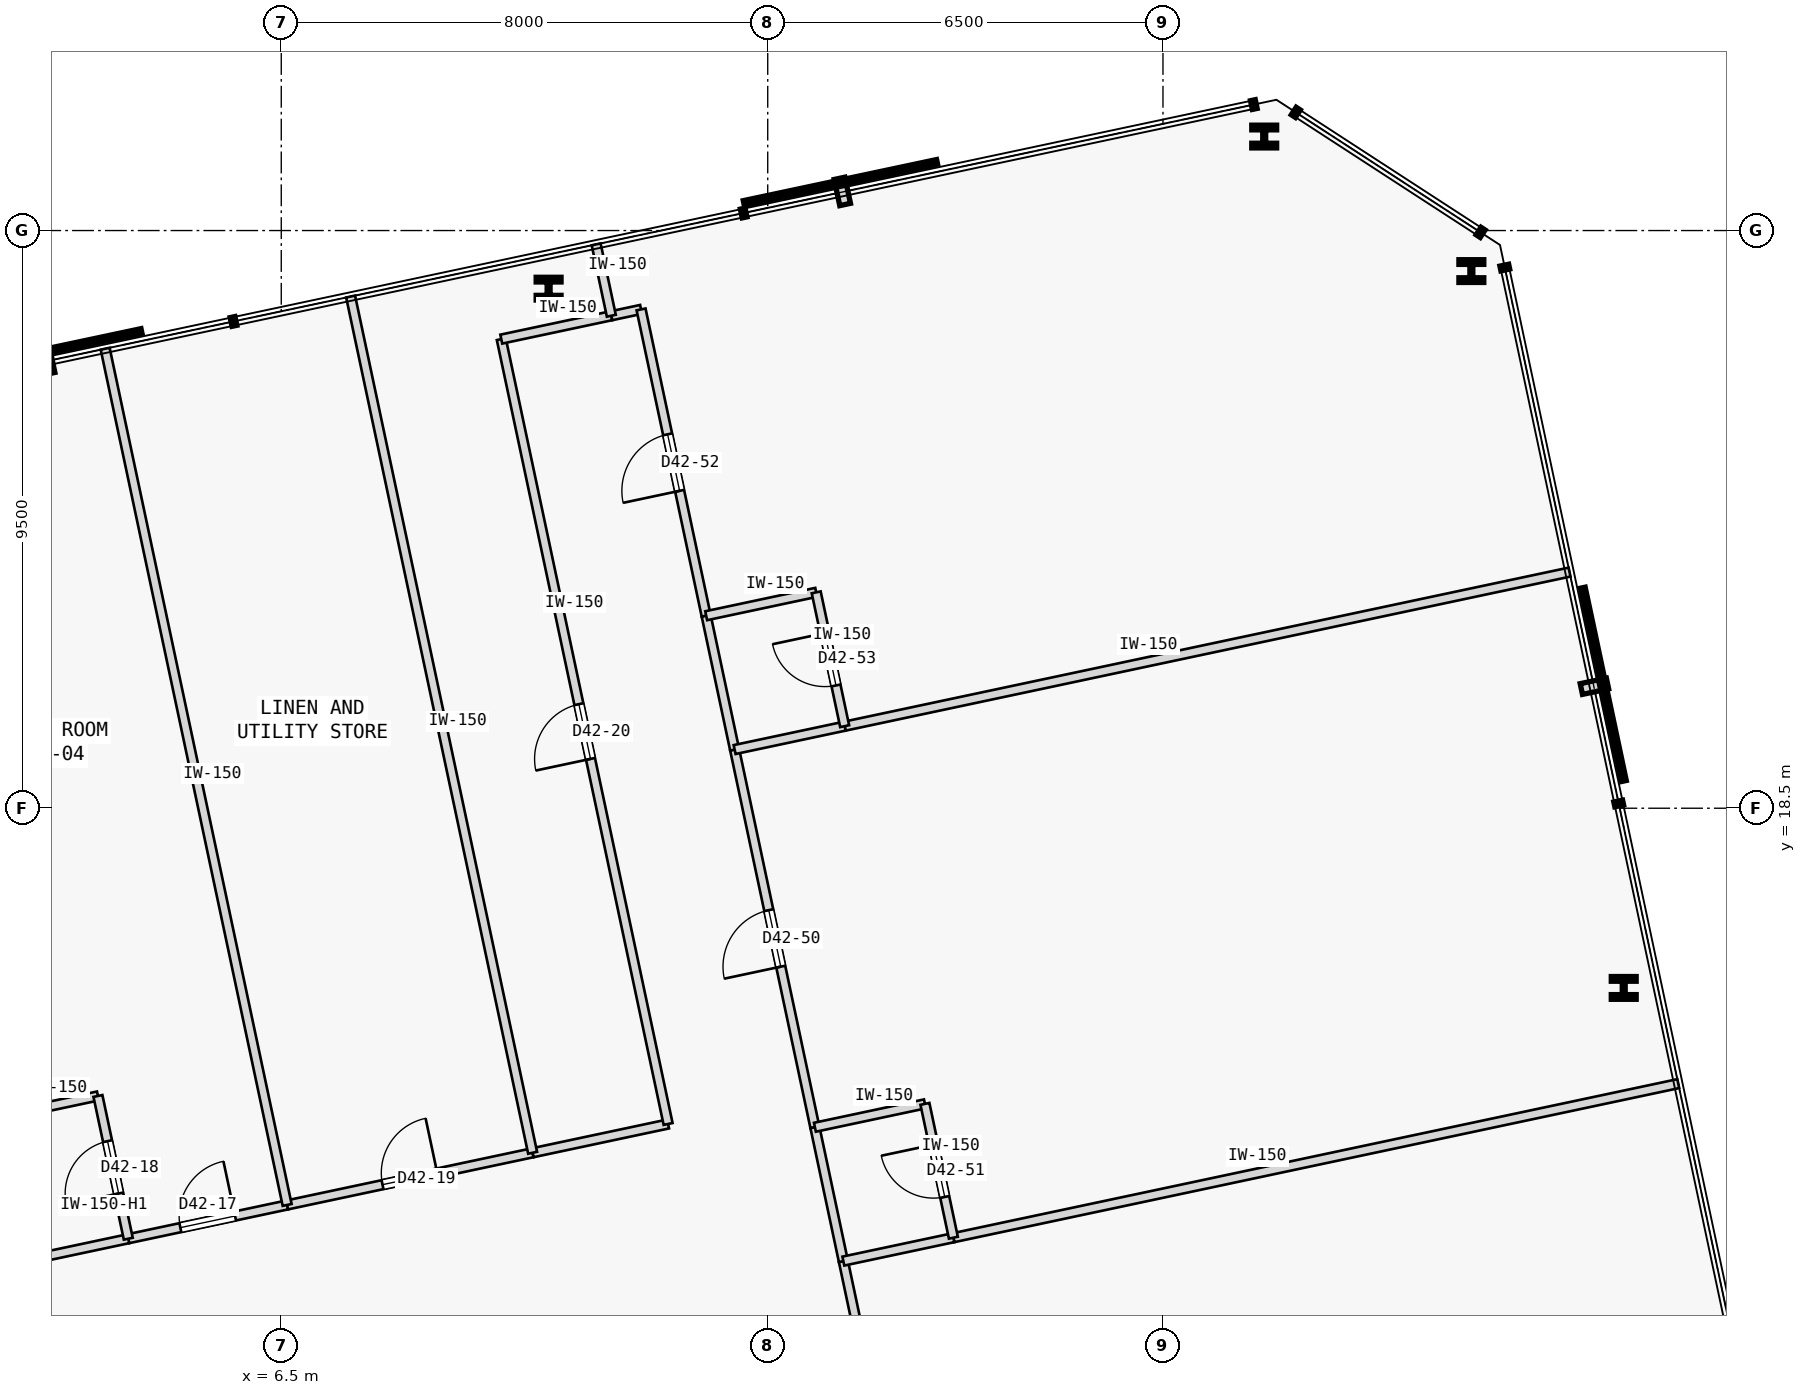
"""IFC4 building model, lengths in metres.
Left out: names, types, materials, properties, quantities, classifications, styles, units other than length and angle.
Written with IfcOpenShell. Run it as: python <this file> out.ifc"""

import sys

from ifc_helpers import new_model, si_unit, direction, frame, frame_2d, origin, origin_2d, place, context, subcontext, project, spatial, rectangle, i_section, extrude, element, fill, save


model = new_model("IFC4")
c1 = context("Model", 3, precision=1e-05, world=origin(), true_north=direction((0.0, 1.0)))
c2 = subcontext(c1, "Body", "Model", "MODEL_VIEW")
j1 = project(units=[si_unit("LENGTHUNIT", "METRE"), si_unit("PLANEANGLEUNIT", "RADIAN")], contexts=[c1])
p1 = place(None, origin())
s1 = spatial("IfcSite", under=j1, at=p1, CompositionType="ELEMENT")
p2 = place(p1, origin())
s2 = spatial("IfcBuilding", under=s1, at=p2, CompositionType="ELEMENT")
p3 = place(p2, frame((0.0, 0.0, 165.0)))
s3 = spatial("IfcBuildingStorey", under=s2, at=p3, CompositionType="ELEMENT", Elevation=165.0)
for number, where, z_axis, x_axis in (
    (1, (28.577, 15.545, 0.0), (0.0, 0.0, 1.0), (1.0, 0.0, 0.0)),
    (2, (26.071, 27.333, 0.0), (0.0, 0.0, 1.0), (1.0, 0.0, 0.0)),
    (3, (22.665, 29.546, 0.0), (0.0, 0.0, 1.0), (1.0, 0.0, 0.0)),
    (4, (10.896, 27.044, 0.0), (0.0, 0.0, 1.0), (1.0, 0.0, 0.0)),
):
    element("IfcColumn", number, at=place(p3, frame(where, z_axis=z_axis, x_axis=x_axis)), inside=s3, PredefinedType="COLUMN", context=c2, shape_type="SweptSolid", body=[
        extrude(i_section(OverallWidth=0.409, OverallDepth=0.374, WebThickness=0.048, FlangeThickness=0.077, FilletRadius=0.015, at=origin_2d()), origin(), (0.0, 0.0, 1.0), 3.4),
    ])
p4 = place(p3, frame((3.984, 11.421, 0.0), z_axis=(0.0, 0.0, 1.0), x_axis=(0.978139565144, 0.207949491702, 0.0)))
e5 = element("IfcWall", 5, at=p4, inside=s3, PredefinedType="PARTITIONING", context=c2, shape_type="SweptSolid", body=[
    extrude(rectangle(XDim=2.671, YDim=0.15, at=frame_2d((1.335, 0.0))), origin(), (0.0, 0.0, 1.0), 3.175),
])
p5 = place(p4, frame((0.875, 0.0, 0.0)))
e6 = element("IfcOpeningElement", 6, at=p5, cuts=e5, PredefinedType="OPENING", context=c2, shape_type="SweptSolid", body=[
    extrude(rectangle(XDim=0.92, YDim=2.15, at=frame_2d((0.46, 1.075))), frame((0.0, 0.085, 0.0), z_axis=(0.0, -1.0, 0.0), x_axis=(1.0, 0.0, 0.0)), (0.0, 0.0, 1.0), 0.17),
])
p6 = place(p3, frame((2.223, 11.046, 0.0), z_axis=(0.0, 0.0, 1.0), x_axis=(0.978146440129, 0.207917150959, 0.0)))
e7 = element("IfcWall", 7, at=p6, inside=s3, PredefinedType="PARTITIONING", context=c2, shape_type="SweptSolid", body=[
    extrude(rectangle(XDim=1.8, YDim=0.15, at=frame_2d((0.9, 0.0))), origin(), (0.0, 0.0, 1.0), 3.175),
])
p7 = place(p3, frame((6.597, 11.976, 0.0), z_axis=(0.0, 0.0, 1.0), x_axis=(0.978155092113, 0.207876443525, 0.0)))
e8 = element("IfcWall", 8, at=p7, inside=s3, PredefinedType="PARTITIONING", context=c2, shape_type="SweptSolid", body=[
    extrude(rectangle(XDim=4.127, YDim=0.15, at=frame_2d((2.063, 0.0))), origin(), (0.0, 0.0, 1.0), 3.175),
])
p8 = place(p7, frame((1.604, 0.0, 0.0)))
e9 = element("IfcOpeningElement", 9, at=p8, cuts=e8, PredefinedType="OPENING", context=c2, shape_type="SweptSolid", body=[
    extrude(rectangle(XDim=0.92, YDim=2.15, at=frame_2d((0.46, 1.075))), frame((0.0, 0.085, 0.0), z_axis=(0.0, -1.0, 0.0), x_axis=(1.0, 0.0, 0.0)), (0.0, 0.0, 1.0), 0.17),
])
p9 = place(p3, frame((10.634, 12.834, 0.0), z_axis=(0.0, 0.0, 1.0), x_axis=(0.978147682212, 0.207911307493, 0.0)))
e10 = element("IfcWall", 10, at=p9, inside=s3, PredefinedType="PARTITIONING", context=c2, shape_type="SweptSolid", body=[
    extrude(rectangle(XDim=2.278, YDim=0.15, at=frame_2d((1.139, 0.0))), origin(), (0.0, 0.0, 1.0), 3.175),
])
p10 = place(p3, frame((12.862, 13.308, 0.0), z_axis=(0.0, 0.0, 1.0), x_axis=(-0.207911421929, 0.978147657888, 0.0)))
e11 = element("IfcWall", 11, at=p10, inside=s3, PredefinedType="PARTITIONING", context=c2, shape_type="SweptSolid", body=[
    extrude(rectangle(XDim=13.195, YDim=0.15, at=frame_2d((6.598, 0.0))), origin(), (0.0, 0.0, 1.0), 3.175),
])
p11 = place(p10, frame((6.137, 0.0, 0.0)))
e12 = element("IfcOpeningElement", 12, at=p11, cuts=e11, PredefinedType="OPENING", context=c2, shape_type="SweptSolid", body=[
    extrude(rectangle(XDim=0.92, YDim=2.15, at=frame_2d((0.46, 1.075))), frame((0.0, 0.085, 0.0), z_axis=(0.0, -1.0, 0.0), x_axis=(1.0, 0.0, 0.0)), (0.0, 0.0, 1.0), 0.17),
])
p12 = place(p3, frame((10.118, 26.214, 0.0), z_axis=(0.0, 0.0, 1.0), x_axis=(0.978133353907, 0.20797870558, 0.0)))
e13 = element("IfcWall", 13, at=p12, inside=s3, PredefinedType="PARTITIONING", context=c2, shape_type="SweptSolid", body=[
    extrude(rectangle(XDim=1.85, YDim=0.15, at=frame_2d((0.925, 0.0))), origin(), (0.0, 0.0, 1.0), 3.175),
])
p13 = place(p3, frame((17.064, 4.841, 0.0), z_axis=(0.0, 0.0, 1.0), x_axis=(-0.207924511115, 0.978144875608, 0.0)))
e14 = element("IfcWall", 14, at=p13, inside=s3, PredefinedType="PARTITIONING", context=c2, shape_type="SweptSolid", body=[
    extrude(rectangle(XDim=6.35, YDim=0.15, at=frame_2d((3.175, 0.0))), origin(), (0.0, 0.0, 1.0), 3.175),
])
p14 = place(p13, frame((2.7, 0.0, 0.0)))
e15 = element("IfcOpeningElement", 15, at=p14, cuts=e14, PredefinedType="OPENING", context=c2, shape_type="SweptSolid", body=[
    extrude(rectangle(XDim=0.95, YDim=2.15, at=frame_2d((0.475, 1.075))), frame((0.0, 0.085, 0.0), z_axis=(0.0, -1.0, 0.0), x_axis=(1.0, 0.0, 0.0)), (0.0, 0.0, 1.0), 0.17),
])
p15 = place(p3, frame((15.276, 13.253, 0.0), z_axis=(0.0, 0.0, 1.0), x_axis=(-0.207924511115, 0.978144875608, 0.0)))
e16 = element("IfcWall", 16, at=p15, inside=s3, PredefinedType="PARTITIONING", context=c2, shape_type="SweptSolid", body=[
    extrude(rectangle(XDim=6.35, YDim=0.15, at=frame_2d((3.175, 0.0))), origin(), (0.0, 0.0, 1.0), 3.175),
])
p16 = place(p15, frame((2.7, 0.0, 0.0)))
e17 = element("IfcOpeningElement", 17, at=p16, cuts=e16, PredefinedType="OPENING", context=c2, shape_type="SweptSolid", body=[
    extrude(rectangle(XDim=0.95, YDim=2.15, at=frame_2d((0.475, 1.075))), frame((0.0, 0.085, 0.0), z_axis=(0.0, -1.0, 0.0), x_axis=(1.0, 0.0, 0.0)), (0.0, 0.0, 1.0), 0.17),
])
p17 = place(p3, frame((15.744, 11.052, 0.0), z_axis=(0.0, 0.0, 1.0), x_axis=(-0.207891197838, 0.978151956427, 0.0)))
e18 = element("IfcWall", 18, at=p17, inside=s3, PredefinedType="PARTITIONING", context=c2, shape_type="SweptSolid", body=[
    extrude(rectangle(XDim=2.25, YDim=0.15, at=frame_2d((1.125, 0.0))), origin(), (0.0, 0.0, 1.0), 3.175),
])
p18 = place(p3, frame((11.928, 26.599, 0.0), z_axis=(0.0, 0.0, 1.0), x_axis=(0.97822210712, 0.207560856478, 0.0)))
e19 = element("IfcWall", 19, at=p18, inside=s3, PredefinedType="PARTITIONING", context=c2, shape_type="SweptSolid", body=[
    extrude(rectangle(XDim=0.5, YDim=0.15, at=frame_2d((0.25, 0.0))), origin(), (0.0, 0.0, 1.0), 3.175),
])
p19 = place(p3, frame((13.488, 21.666, 0.0), z_axis=(0.0, 0.0, 1.0), x_axis=(-0.207926226209, 0.978144511028, 0.0)))
e20 = element("IfcWall", 20, at=p19, inside=s3, PredefinedType="PARTITIONING", context=c2, shape_type="SweptSolid", body=[
    extrude(rectangle(XDim=5.15, YDim=0.15, at=frame_2d((2.575, 0.0))), origin(), (0.0, 0.0, 1.0), 3.175),
])
p20 = place(p19, frame((2.1, 0.0, 0.0)))
e21 = element("IfcOpeningElement", 21, at=p20, cuts=e20, PredefinedType="OPENING", context=c2, shape_type="SweptSolid", body=[
    extrude(rectangle(XDim=0.95, YDim=2.15, at=frame_2d((0.475, 1.075))), frame((0.0, 0.085, 0.0), z_axis=(0.0, -1.0, 0.0), x_axis=(1.0, 0.0, 0.0)), (0.0, 0.0, 1.0), 0.17),
])
p21 = place(p3, frame((13.956, 19.465, 0.0), z_axis=(0.0, 0.0, 1.0), x_axis=(-0.207891197838, 0.978151956427, 0.0)))
e22 = element("IfcWall", 22, at=p21, inside=s3, PredefinedType="PARTITIONING", context=c2, shape_type="SweptSolid", body=[
    extrude(rectangle(XDim=2.25, YDim=0.15, at=frame_2d((1.125, 0.0))), origin(), (0.0, 0.0, 1.0), 3.175),
])
p22 = place(p3, frame((1.725, 13.394, 0.0), z_axis=(0.0, 0.0, 1.0), x_axis=(0.978140575842, 0.207944737591, 0.0)))
e23 = element("IfcWall", 23, at=p22, inside=s3, PredefinedType="PARTITIONING", context=c2, shape_type="SweptSolid", body=[
    extrude(rectangle(XDim=1.8, YDim=0.15, at=frame_2d((0.9, 0.0))), origin(), (0.0, 0.0, 1.0), 3.175),
])
p23 = place(p3, frame((3.984, 11.421, 0.0), z_axis=(0.0, 0.0, 1.0), x_axis=(-0.207917150959, 0.978146440129, 0.0)))
e24 = element("IfcWall", 24, at=p23, inside=s3, PredefinedType="PARTITIONING", context=c2, shape_type="SweptSolid", body=[
    extrude(rectangle(XDim=2.4, YDim=0.15, at=frame_2d((1.2, 0.0))), origin(), (0.0, 0.0, 1.0), 2.725),
])
p24 = place(p23, frame((0.76, 0.0, 0.0)))
e25 = element("IfcOpeningElement", 25, at=p24, cuts=e24, PredefinedType="OPENING", context=c2, shape_type="SweptSolid", body=[
    extrude(rectangle(XDim=0.88, YDim=2.15, at=frame_2d((0.44, 1.075))), frame((0.0, 0.085, 0.0), z_axis=(0.0, -1.0, 0.0), x_axis=(1.0, 0.0, 0.0)), (0.0, 0.0, 1.0), 0.17),
])
p25 = place(p3, frame((6.597, 11.976, 0.0), z_axis=(0.0, 0.0, 1.0), x_axis=(-0.207899121568, 0.978150272326, 0.0)))
e26 = element("IfcWall", 26, at=p25, inside=s3, PredefinedType="PARTITIONING", context=c2, shape_type="SweptSolid", body=[
    extrude(rectangle(XDim=14.395, YDim=0.15, at=frame_2d((7.197, 0.0))), origin(), (0.0, 0.0, 1.0), 3.175),
])
p26 = place(p3, frame((10.634, 12.834, 0.0), z_axis=(0.0, 0.0, 1.0), x_axis=(-0.207911899531, 0.97814755637, 0.0)))
e27 = element("IfcWall", 27, at=p26, inside=s3, PredefinedType="PARTITIONING", context=c2, shape_type="SweptSolid", body=[
    extrude(rectangle(XDim=14.395, YDim=0.15, at=frame_2d((7.198, 0.0))), origin(), (0.0, 0.0, 1.0), 3.175),
])
p27 = place(p3, frame((11.928, 26.599, 0.0), z_axis=(0.0, 0.0, 1.0), x_axis=(-0.20795853359, 0.978137642823, 0.0)))
e28 = element("IfcWall", 28, at=p27, inside=s3, PredefinedType="PARTITIONING", context=c2, shape_type="SweptSolid", body=[
    extrude(rectangle(XDim=1.2, YDim=0.15, at=frame_2d((0.6, 0.0))), origin(), (0.0, 0.0, 1.0), 3.175),
])
p28 = place(p3, frame((17.553, 11.437, 0.0), z_axis=(0.0, 0.0, 1.0), x_axis=(0.97814556055, 0.207921288896, 0.0)))
e29 = element("IfcWall", 29, at=p28, inside=s3, PredefinedType="PARTITIONING", context=c2, shape_type="SweptSolid", body=[
    extrude(rectangle(XDim=12.187, YDim=0.15, at=frame_2d((6.094, 0.0))), origin(), (0.0, 0.0, 1.0), 3.175),
])
for number, where, z_axis, x_axis in (
    (30, (15.744, 11.052, 0.0), (0.0, 0.0, 1.0), (0.978, 0.208, 0.0)),
    (31, (15.276, 13.253, 0.0), (0.0, 0.0, 1.0), (0.978, 0.208, 0.0)),
):
    element("IfcWall", number, at=place(p3, frame(where, z_axis=z_axis, x_axis=x_axis)), inside=s3, PredefinedType="PARTITIONING", context=c2, shape_type="SweptSolid", body=[
        extrude(rectangle(XDim=1.85, YDim=0.15, at=frame_2d((0.925, 0.0))), origin(), (0.0, 0.0, 1.0), 3.175),
    ])
p29 = place(p3, frame((17.553, 11.437, 0.0), z_axis=(0.0, 0.0, 1.0), x_axis=(-0.207891197838, 0.978151956427, 0.0)))
e32 = element("IfcWall", 32, at=p29, inside=s3, PredefinedType="PARTITIONING", context=c2, shape_type="SweptSolid", body=[
    extrude(rectangle(XDim=2.25, YDim=0.15, at=frame_2d((1.125, 0.0))), origin(), (0.0, 0.0, 1.0), 3.175),
])
p30 = place(p29, frame((0.685, 0.0, 0.0)))
e33 = element("IfcOpeningElement", 33, at=p30, cuts=e32, PredefinedType="OPENING", context=c2, shape_type="SweptSolid", body=[
    extrude(rectangle(XDim=0.88, YDim=2.15, at=frame_2d((0.44, 1.075))), frame((0.0, 0.085, 0.0), z_axis=(0.0, -1.0, 0.0), x_axis=(1.0, 0.0, 0.0)), (0.0, 0.0, 1.0), 0.17),
])
p31 = place(p3, frame((15.765, 19.849, 0.0), z_axis=(0.0, 0.0, 1.0), x_axis=(0.978149634612, 0.207902121941, 0.0)))
e34 = element("IfcWall", 34, at=p31, inside=s3, PredefinedType="PARTITIONING", context=c2, shape_type="SweptSolid", body=[
    extrude(rectangle(XDim=12.187, YDim=0.15, at=frame_2d((6.094, 0.0))), origin(), (0.0, 0.0, 1.0), 3.175),
])
for number, where, z_axis, x_axis in (
    (35, (13.956, 19.465, 0.0), (0.0, 0.0, 1.0), (0.978, 0.208, 0.0)),
    (36, (13.488, 21.666, 0.0), (0.0, 0.0, 1.0), (0.978, 0.208, 0.0)),
):
    element("IfcWall", number, at=place(p3, frame(where, z_axis=z_axis, x_axis=x_axis)), inside=s3, PredefinedType="PARTITIONING", context=c2, shape_type="SweptSolid", body=[
        extrude(rectangle(XDim=1.85, YDim=0.15, at=frame_2d((0.925, 0.0))), origin(), (0.0, 0.0, 1.0), 3.175),
    ])
p32 = place(p3, frame((15.765, 19.849, 0.0), z_axis=(0.0, 0.0, 1.0), x_axis=(-0.207891197838, 0.978151956427, 0.0)))
e37 = element("IfcWall", 37, at=p32, inside=s3, PredefinedType="PARTITIONING", context=c2, shape_type="SweptSolid", body=[
    extrude(rectangle(XDim=2.25, YDim=0.15, at=frame_2d((1.125, 0.0))), origin(), (0.0, 0.0, 1.0), 3.175),
])
p33 = place(p32, frame((0.685, 0.0, 0.0)))
e38 = element("IfcOpeningElement", 38, at=p33, cuts=e37, PredefinedType="OPENING", context=c2, shape_type="SweptSolid", body=[
    extrude(rectangle(XDim=0.88, YDim=2.15, at=frame_2d((0.44, 1.075))), frame((0.0, 0.085, 0.0), z_axis=(0.0, -1.0, 0.0), x_axis=(1.0, 0.0, 0.0)), (0.0, 0.0, 1.0), 0.17),
])
p34 = place(p5, origin())
e39 = element("IfcDoor", 39, at=p34, inside=s3, OperationType="SINGLE_SWING_RIGHT", PredefinedType="DOOR", context=c2, shape_type="SweptSolid", body=[
    extrude(rectangle(XDim=0.92, YDim=2.15, at=frame_2d((0.46, 1.075))), frame((0.0, 0.025, 0.0), z_axis=(0.0, -1.0, 0.0), x_axis=(1.0, 0.0, 0.0)), (0.0, 0.0, 1.0), 0.05),
])
fill(e6, e39)
p35 = place(p24, origin())
e40 = element("IfcDoor", 40, at=p35, inside=s3, OperationType="SINGLE_SWING_LEFT", PredefinedType="DOOR", context=c2, shape_type="SweptSolid", body=[
    extrude(rectangle(XDim=0.88, YDim=2.15, at=frame_2d((0.44, 1.075))), frame((0.0, 0.025, 0.0), z_axis=(0.0, -1.0, 0.0), x_axis=(1.0, 0.0, 0.0)), (0.0, 0.0, 1.0), 0.05),
])
fill(e25, e40)
p36 = place(p8, origin())
e41 = element("IfcDoor", 41, at=p36, inside=s3, OperationType="SINGLE_SWING_RIGHT", PredefinedType="DOOR", context=c2, shape_type="SweptSolid", body=[
    extrude(rectangle(XDim=0.92, YDim=2.15, at=frame_2d((0.46, 1.075))), frame((0.0, 0.025, 0.0), z_axis=(0.0, -1.0, 0.0), x_axis=(1.0, 0.0, 0.0)), (0.0, 0.0, 1.0), 0.05),
])
fill(e9, e41)
p37 = place(p11, origin())
e42 = element("IfcDoor", 42, at=p37, inside=s3, OperationType="SINGLE_SWING_LEFT", PredefinedType="DOOR", context=c2, shape_type="SweptSolid", body=[
    extrude(rectangle(XDim=0.92, YDim=2.15, at=frame_2d((0.46, 1.075))), frame((0.0, 0.025, 0.0), z_axis=(0.0, -1.0, 0.0), x_axis=(1.0, 0.0, 0.0)), (0.0, 0.0, 1.0), 0.05),
])
fill(e12, e42)
p38 = place(p16, origin())
e43 = element("IfcDoor", 43, at=p38, inside=s3, OperationType="SINGLE_SWING_LEFT", PredefinedType="DOOR", context=c2, shape_type="SweptSolid", body=[
    extrude(rectangle(XDim=0.95, YDim=2.15, at=frame_2d((0.475, 1.075))), frame((0.0, 0.025, 0.0), z_axis=(0.0, -1.0, 0.0), x_axis=(1.0, 0.0, 0.0)), (0.0, 0.0, 1.0), 0.05),
])
fill(e17, e43)
p39 = place(p30, origin())
e44 = element("IfcDoor", 44, at=p39, inside=s3, OperationType="SINGLE_SWING_RIGHT", PredefinedType="DOOR", context=c2, shape_type="SweptSolid", body=[
    extrude(rectangle(XDim=0.88, YDim=2.15, at=frame_2d((0.44, 1.075))), frame((0.0, 0.025, 0.0), z_axis=(0.0, -1.0, 0.0), x_axis=(1.0, 0.0, 0.0)), (0.0, 0.0, 1.0), 0.05),
])
fill(e33, e44)
p40 = place(p20, origin())
e45 = element("IfcDoor", 45, at=p40, inside=s3, OperationType="SINGLE_SWING_LEFT", PredefinedType="DOOR", context=c2, shape_type="SweptSolid", body=[
    extrude(rectangle(XDim=0.95, YDim=2.15, at=frame_2d((0.475, 1.075))), frame((0.0, 0.025, 0.0), z_axis=(0.0, -1.0, 0.0), x_axis=(1.0, 0.0, 0.0)), (0.0, 0.0, 1.0), 0.05),
])
fill(e21, e45)
p41 = place(p33, origin())
e46 = element("IfcDoor", 46, at=p41, inside=s3, OperationType="SINGLE_SWING_RIGHT", PredefinedType="DOOR", context=c2, shape_type="SweptSolid", body=[
    extrude(rectangle(XDim=0.88, YDim=2.15, at=frame_2d((0.44, 1.075))), frame((0.0, 0.025, 0.0), z_axis=(0.0, -1.0, 0.0), x_axis=(1.0, 0.0, 0.0)), (0.0, 0.0, 1.0), 0.05),
])
fill(e38, e46)
save(model, sys.argv[1])
